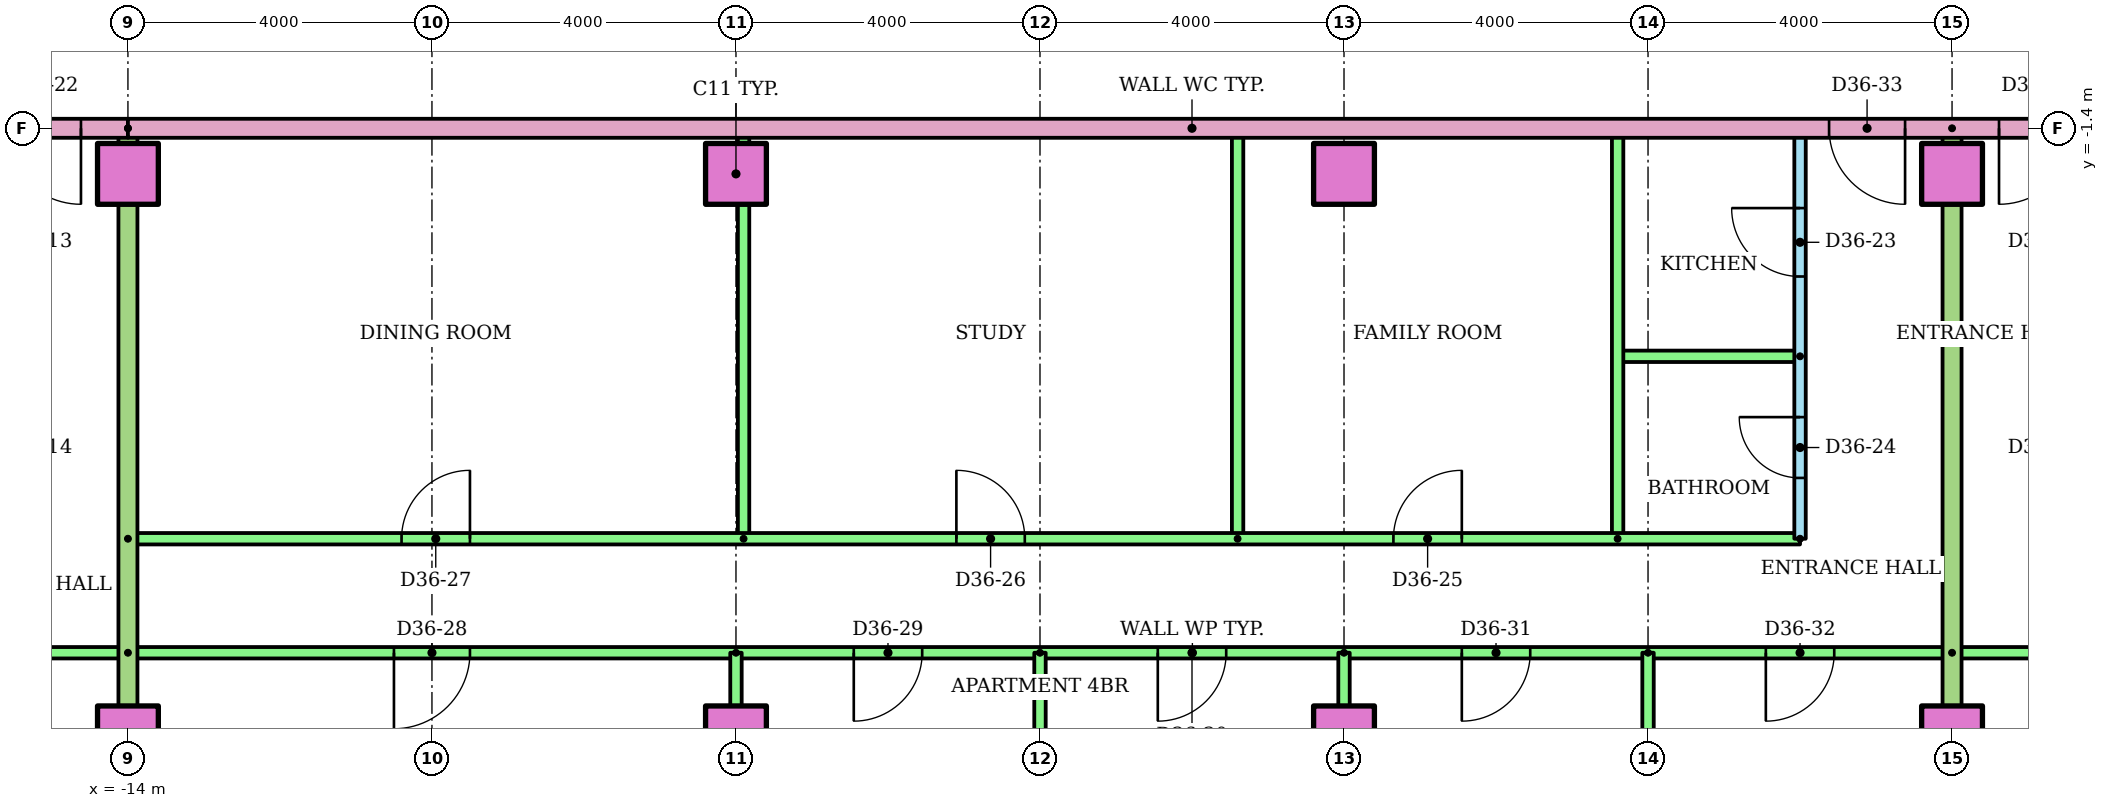
"""IFC4 building model, lengths in metres.
Left out: names, types, materials, properties, quantities, classifications, styles, units other than length and angle.
Written with IfcOpenShell. Run it as: python <this file> out.ifc"""

import sys

from ifc_helpers import new_model, si_unit, direction, frame, frame_2d, origin, origin_2d, place, context, subcontext, project, spatial, rectangle, extrude, element, fill, save


model = new_model("IFC4")
c1 = context("Model", 3, precision=1e-05, world=origin(), true_north=direction((0.0, 1.0)))
c2 = subcontext(c1, "Body", "Model", "MODEL_VIEW")
j1 = project(units=[si_unit("LENGTHUNIT", "METRE"), si_unit("PLANEANGLEUNIT", "RADIAN")], contexts=[c1])
p1 = place(None, origin())
s1 = spatial("IfcSite", under=j1, at=p1, CompositionType="ELEMENT")
p2 = place(p1, origin())
s2 = spatial("IfcBuilding", under=s1, at=p2, CompositionType="ELEMENT")
p3 = place(p2, frame((0.0, 0.0, 139.0)))
s3 = spatial("IfcBuildingStorey", under=s2, at=p3, CompositionType="ELEMENT", Elevation=139.0)
for number, where in (
    (1, (-14.0, -9.4, 0.0)),
    (2, (-6.0, -9.4, 0.0)),
    (3, (2.0, -9.4, 0.0)),
    (4, (10.0, -9.4, 0.0)),
    (5, (-14.0, -2.0, 0.0)),
    (6, (-6.0, -2.0, 0.0)),
    (7, (2.0, -2.0, 0.0)),
    (8, (10.0, -2.0, 0.0)),
):
    element("IfcColumn", number, at=place(p3, frame(where)), inside=s3, PredefinedType="COLUMN", context=c2, shape_type="SweptSolid", body=[
        extrude(rectangle(XDim=0.8, YDim=0.8, at=origin_2d()), origin(), (0.0, 0.0, 1.0), 3.2),
    ])
p4 = place(p3, frame((-14.0, -8.3, 0.0), z_axis=(0.0, 0.0, 1.0), x_axis=(-1.0, 0.0, 0.0)))
e9 = element("IfcWall", 9, at=p4, inside=s3, PredefinedType="PARTITIONING", context=c2, shape_type="SweptSolid", body=[
    extrude(rectangle(XDim=18.71, YDim=0.15, at=frame_2d((9.355, 0.0))), origin(), (0.0, 0.0, 1.0), 2.4),
])
p5 = place(p4, frame((16.618, 0.0, 0.0)))
e10 = element("IfcOpeningElement", 10, at=p5, cuts=e9, PredefinedType="OPENING", context=c2, shape_type="SweptSolid", body=[
    extrude(rectangle(XDim=0.9, YDim=2.1, at=frame_2d((0.45, 1.05))), frame((0.0, 0.085, 0.0), z_axis=(0.0, -1.0, 0.0), x_axis=(1.0, 0.0, 0.0)), (0.0, 0.0, 1.0), 0.17),
])
p6 = place(p4, frame((10.5, 0.0, 0.0)))
e11 = element("IfcOpeningElement", 11, at=p6, cuts=e9, PredefinedType="OPENING", context=c2, shape_type="SweptSolid", body=[
    extrude(rectangle(XDim=1.0, YDim=2.1, at=frame_2d((0.5, 1.05))), frame((0.0, 0.085, 0.0), z_axis=(0.0, -1.0, 0.0), x_axis=(1.0, 0.0, 0.0)), (0.0, 0.0, 1.0), 0.17),
])
p7 = place(p4, frame((5.55, 0.0, 0.0)))
e12 = element("IfcOpeningElement", 12, at=p7, cuts=e9, PredefinedType="OPENING", context=c2, shape_type="SweptSolid", body=[
    extrude(rectangle(XDim=0.9, YDim=2.1, at=frame_2d((0.45, 1.05))), frame((0.0, 0.085, 0.0), z_axis=(0.0, -1.0, 0.0), x_axis=(1.0, 0.0, 0.0)), (0.0, 0.0, 1.0), 0.17),
])
p8 = place(p4, frame((1.55, 0.0, 0.0)))
e13 = element("IfcOpeningElement", 13, at=p8, cuts=e9, PredefinedType="OPENING", context=c2, shape_type="SweptSolid", body=[
    extrude(rectangle(XDim=0.9, YDim=2.1, at=frame_2d((0.45, 1.05))), frame((0.0, 0.085, 0.0), z_axis=(0.0, -1.0, 0.0), x_axis=(1.0, 0.0, 0.0)), (0.0, 0.0, 1.0), 0.17),
])
p9 = place(p3, frame((8.0, -6.8, 0.0), z_axis=(0.0, 0.0, 1.0), x_axis=(0.0, 1.0, 0.0)))
e14 = element("IfcWall", 14, at=p9, inside=s3, PredefinedType="PARTITIONING", context=c2, shape_type="SweptSolid", body=[
    extrude(rectangle(XDim=5.4, YDim=0.15, at=frame_2d((2.7, 0.0))), origin(), (0.0, 0.0, 1.0), 2.4),
])
p10 = place(p9, frame((3.45, 0.0, 0.0)))
e15 = element("IfcOpeningElement", 15, at=p10, cuts=e14, PredefinedType="OPENING", context=c2, shape_type="SweptSolid", body=[
    extrude(rectangle(XDim=0.9, YDim=2.1, at=frame_2d((0.45, 1.05))), frame((0.0, 0.085, 0.0), z_axis=(0.0, -1.0, 0.0), x_axis=(1.0, 0.0, 0.0)), (0.0, 0.0, 1.0), 0.17),
])
p11 = place(p9, frame((0.8, 0.0, 0.0)))
e16 = element("IfcOpeningElement", 16, at=p11, cuts=e14, PredefinedType="OPENING", context=c2, shape_type="SweptSolid", body=[
    extrude(rectangle(XDim=0.8, YDim=2.1, at=frame_2d((0.4, 1.05))), frame((0.0, 0.085, 0.0), z_axis=(0.0, -1.0, 0.0), x_axis=(1.0, 0.0, 0.0)), (0.0, 0.0, 1.0), 0.17),
])
p12 = place(p3, frame((8.0, -4.4, 0.0), z_axis=(0.0, 0.0, 1.0), x_axis=(-1.0, 0.0, 0.0)))
e17 = element("IfcWall", 17, at=p12, inside=s3, PredefinedType="PARTITIONING", context=c2, shape_type="SweptSolid", body=[
    extrude(rectangle(XDim=2.4, YDim=0.15, at=frame_2d((1.2, 0.0))), origin(), (0.0, 0.0, 1.0), 2.4),
])
for number, where, z_axis, x_axis in (
    (18, (5.6, -6.8, 0.0), (0.0, 0.0, 1.0), (0.0, 1.0, 0.0)),
    (19, (0.6, -6.8, 0.0), (0.0, 0.0, 1.0), (0.0, 1.0, 0.0)),
    (20, (-5.9, -6.8, 0.0), (0.0, 0.0, 1.0), (0.0, 1.0, 0.0)),
):
    element("IfcWall", number, at=place(p3, frame(where, z_axis=z_axis, x_axis=x_axis)), inside=s3, PredefinedType="PARTITIONING", context=c2, shape_type="SweptSolid", body=[
        extrude(rectangle(XDim=5.4, YDim=0.15, at=frame_2d((2.7, 0.0))), origin(), (0.0, 0.0, 1.0), 2.4),
    ])
p13 = place(p3, frame((-14.0, -6.8, 0.0)))
e21 = element("IfcWall", 21, at=p13, inside=s3, PredefinedType="PARTITIONING", context=c2, shape_type="SweptSolid", body=[
    extrude(rectangle(XDim=22.0, YDim=0.15, at=frame_2d((11.0, 0.0))), origin(), (0.0, 0.0, 1.0), 2.4),
])
p14 = place(p13, frame((16.65, 0.0, 0.0)))
e22 = element("IfcOpeningElement", 22, at=p14, cuts=e21, PredefinedType="OPENING", context=c2, shape_type="SweptSolid", body=[
    extrude(rectangle(XDim=0.9, YDim=2.1, at=frame_2d((0.45, 1.05))), frame((0.0, 0.085, 0.0), z_axis=(0.0, -1.0, 0.0), x_axis=(1.0, 0.0, 0.0)), (0.0, 0.0, 1.0), 0.17),
])
p15 = place(p13, frame((10.9, 0.0, 0.0)))
e23 = element("IfcOpeningElement", 23, at=p15, cuts=e21, PredefinedType="OPENING", context=c2, shape_type="SweptSolid", body=[
    extrude(rectangle(XDim=0.9, YDim=2.1, at=frame_2d((0.45, 1.05))), frame((0.0, 0.085, 0.0), z_axis=(0.0, -1.0, 0.0), x_axis=(1.0, 0.0, 0.0)), (0.0, 0.0, 1.0), 0.17),
])
p16 = place(p13, frame((3.6, 0.0, 0.0)))
e24 = element("IfcOpeningElement", 24, at=p16, cuts=e21, PredefinedType="OPENING", context=c2, shape_type="SweptSolid", body=[
    extrude(rectangle(XDim=0.9, YDim=2.1, at=frame_2d((0.45, 1.05))), frame((0.0, 0.085, 0.0), z_axis=(0.0, -1.0, 0.0), x_axis=(1.0, 0.0, 0.0)), (0.0, 0.0, 1.0), 0.17),
])
p17 = place(p3, frame((10.0, -8.3, 0.0), z_axis=(0.0, 0.0, 1.0), x_axis=(-1.0, 0.0, 0.0)))
e25 = element("IfcWall", 25, at=p17, inside=s3, PredefinedType="PARTITIONING", context=c2, shape_type="SweptSolid", body=[
    extrude(rectangle(XDim=24.0, YDim=0.15, at=frame_2d((12.0, 0.0))), origin(), (0.0, 0.0, 1.0), 2.4),
])
p18 = place(p17, frame((19.5, 0.0, 0.0)))
e26 = element("IfcOpeningElement", 26, at=p18, cuts=e25, PredefinedType="OPENING", context=c2, shape_type="SweptSolid", body=[
    extrude(rectangle(XDim=1.0, YDim=2.1, at=frame_2d((0.5, 1.05))), frame((0.0, 0.085, 0.0), z_axis=(0.0, -1.0, 0.0), x_axis=(1.0, 0.0, 0.0)), (0.0, 0.0, 1.0), 0.17),
])
p19 = place(p17, frame((13.55, 0.0, 0.0)))
e27 = element("IfcOpeningElement", 27, at=p19, cuts=e25, PredefinedType="OPENING", context=c2, shape_type="SweptSolid", body=[
    extrude(rectangle(XDim=0.9, YDim=2.1, at=frame_2d((0.45, 1.05))), frame((0.0, 0.085, 0.0), z_axis=(0.0, -1.0, 0.0), x_axis=(1.0, 0.0, 0.0)), (0.0, 0.0, 1.0), 0.17),
])
p20 = place(p17, frame((9.55, 0.0, 0.0)))
e28 = element("IfcOpeningElement", 28, at=p20, cuts=e25, PredefinedType="OPENING", context=c2, shape_type="SweptSolid", body=[
    extrude(rectangle(XDim=0.9, YDim=2.1, at=frame_2d((0.45, 1.05))), frame((0.0, 0.085, 0.0), z_axis=(0.0, -1.0, 0.0), x_axis=(1.0, 0.0, 0.0)), (0.0, 0.0, 1.0), 0.17),
])
p21 = place(p17, frame((5.55, 0.0, 0.0)))
e29 = element("IfcOpeningElement", 29, at=p21, cuts=e25, PredefinedType="OPENING", context=c2, shape_type="SweptSolid", body=[
    extrude(rectangle(XDim=0.9, YDim=2.1, at=frame_2d((0.45, 1.05))), frame((0.0, 0.085, 0.0), z_axis=(0.0, -1.0, 0.0), x_axis=(1.0, 0.0, 0.0)), (0.0, 0.0, 1.0), 0.17),
])
p22 = place(p17, frame((1.55, 0.0, 0.0)))
e30 = element("IfcOpeningElement", 30, at=p22, cuts=e25, PredefinedType="OPENING", context=c2, shape_type="SweptSolid", body=[
    extrude(rectangle(XDim=0.9, YDim=2.1, at=frame_2d((0.45, 1.05))), frame((0.0, 0.085, 0.0), z_axis=(0.0, -1.0, 0.0), x_axis=(1.0, 0.0, 0.0)), (0.0, 0.0, 1.0), 0.17),
])
p23 = place(p3, frame((-6.0, -8.3, 0.0), z_axis=(0.0, 0.0, 1.0), x_axis=(0.0, -1.0, 0.0)))
e31 = element("IfcWall", 31, at=p23, inside=s3, PredefinedType="PARTITIONING", context=c2, shape_type="SweptSolid", body=[
    extrude(rectangle(XDim=8.01, YDim=0.15, at=frame_2d((4.005, 0.0))), origin(), (0.0, 0.0, 1.0), 2.4),
])
p24 = place(p3, frame((-2.0, -8.3, 0.0), z_axis=(0.0, 0.0, 1.0), x_axis=(0.0, -1.0, 0.0)))
e32 = element("IfcWall", 32, at=p24, inside=s3, PredefinedType="PARTITIONING", context=c2, shape_type="SweptSolid", body=[
    extrude(rectangle(XDim=8.021, YDim=0.15, at=frame_2d((4.01, 0.0))), origin(), (0.0, 0.0, 1.0), 2.4),
])
p25 = place(p3, frame((2.0, -8.3, 0.0), z_axis=(0.0, 0.0, 1.0), x_axis=(0.0, -1.0, 0.0)))
e33 = element("IfcWall", 33, at=p25, inside=s3, PredefinedType="PARTITIONING", context=c2, shape_type="SweptSolid", body=[
    extrude(rectangle(XDim=8.01, YDim=0.15, at=frame_2d((4.005, 0.0))), origin(), (0.0, 0.0, 1.0), 2.4),
])
p26 = place(p3, frame((6.0, -8.3, 0.0), z_axis=(0.0, 0.0, 1.0), x_axis=(0.0, -1.0, 0.0)))
e34 = element("IfcWall", 34, at=p26, inside=s3, PredefinedType="PARTITIONING", context=c2, shape_type="SweptSolid", body=[
    extrude(rectangle(XDim=8.021, YDim=0.15, at=frame_2d((4.01, 0.0))), origin(), (0.0, 0.0, 1.0), 2.4),
])
p27 = place(p3, frame((-14.0, -1.4, 0.0), z_axis=(0.0, 0.0, 1.0), x_axis=(0.0, -1.0, 0.0)))
e35 = element("IfcWall", 35, at=p27, inside=s3, PredefinedType="PARTITIONING", context=c2, shape_type="SweptSolid", body=[
    extrude(rectangle(XDim=14.91, YDim=0.25, at=frame_2d((7.455, 0.0))), origin(), (0.0, 0.0, 1.0), 2.4),
])
p28 = place(p3, frame((32.72, -8.3, 0.0), z_axis=(0.0, 0.0, 1.0), x_axis=(-1.0, 0.0, 0.0)))
e36 = element("IfcWall", 36, at=p28, inside=s3, PredefinedType="PARTITIONING", context=c2, shape_type="SweptSolid", body=[
    extrude(rectangle(XDim=22.72, YDim=0.15, at=frame_2d((11.36, 0.0))), origin(), (0.0, 0.0, 1.0), 2.4),
])
p29 = place(p28, frame((20.27, 0.0, 0.0)))
e37 = element("IfcOpeningElement", 37, at=p29, cuts=e36, PredefinedType="OPENING", context=c2, shape_type="SweptSolid", body=[
    extrude(rectangle(XDim=0.9, YDim=2.1, at=frame_2d((0.45, 1.05))), frame((0.0, 0.085, 0.0), z_axis=(0.0, -1.0, 0.0), x_axis=(1.0, 0.0, 0.0)), (0.0, 0.0, 1.0), 0.17),
])
p30 = place(p28, frame((16.27, 0.0, 0.0)))
e38 = element("IfcOpeningElement", 38, at=p30, cuts=e36, PredefinedType="OPENING", context=c2, shape_type="SweptSolid", body=[
    extrude(rectangle(XDim=0.9, YDim=2.1, at=frame_2d((0.45, 1.05))), frame((0.0, 0.085, 0.0), z_axis=(0.0, -1.0, 0.0), x_axis=(1.0, 0.0, 0.0)), (0.0, 0.0, 1.0), 0.17),
])
p31 = place(p28, frame((12.27, 0.0, 0.0)))
e39 = element("IfcOpeningElement", 39, at=p31, cuts=e36, PredefinedType="OPENING", context=c2, shape_type="SweptSolid", body=[
    extrude(rectangle(XDim=0.9, YDim=2.1, at=frame_2d((0.45, 1.05))), frame((0.0, 0.085, 0.0), z_axis=(0.0, -1.0, 0.0), x_axis=(1.0, 0.0, 0.0)), (0.0, 0.0, 1.0), 0.17),
])
p32 = place(p28, frame((8.22, 0.0, 0.0)))
e40 = element("IfcOpeningElement", 40, at=p32, cuts=e36, PredefinedType="OPENING", context=c2, shape_type="SweptSolid", body=[
    extrude(rectangle(XDim=1.0, YDim=2.1, at=frame_2d((0.5, 1.05))), frame((0.0, 0.085, 0.0), z_axis=(0.0, -1.0, 0.0), x_axis=(1.0, 0.0, 0.0)), (0.0, 0.0, 1.0), 0.17),
])
p33 = place(p28, frame((3.02, 0.0, 0.0)))
e41 = element("IfcOpeningElement", 41, at=p33, cuts=e36, PredefinedType="OPENING", context=c2, shape_type="SweptSolid", body=[
    extrude(rectangle(XDim=0.9, YDim=2.1, at=frame_2d((0.45, 1.05))), frame((0.0, 0.085, 0.0), z_axis=(0.0, -1.0, 0.0), x_axis=(1.0, 0.0, 0.0)), (0.0, 0.0, 1.0), 0.17),
])
p34 = place(p3, frame((10.0, -1.4, 0.0), z_axis=(0.0, 0.0, 1.0), x_axis=(0.0, -1.0, 0.0)))
e42 = element("IfcWall", 42, at=p34, inside=s3, PredefinedType="PARTITIONING", context=c2, shape_type="SweptSolid", body=[
    extrude(rectangle(XDim=14.91, YDim=0.25, at=frame_2d((7.455, 0.0))), origin(), (0.0, 0.0, 1.0), 2.4),
])
p35 = place(p3, frame((-14.0, -1.4, 0.0), z_axis=(0.0, 0.0, 1.0), x_axis=(-1.0, 0.0, 0.0)))
e43 = element("IfcWall", 43, at=p35, inside=s3, PredefinedType="PARTITIONING", context=c2, shape_type="SweptSolid", body=[
    extrude(rectangle(XDim=15.0, YDim=0.25, at=frame_2d((7.5, 0.0))), origin(), (0.0, 0.0, 1.0), 2.4),
])
p36 = place(p35, frame((0.618, 0.0, 0.0)))
e44 = element("IfcOpeningElement", 44, at=p36, cuts=e43, PredefinedType="OPENING", context=c2, shape_type="SweptSolid", body=[
    extrude(rectangle(XDim=1.0, YDim=2.1, at=frame_2d((0.5, 1.05))), frame((0.0, 0.135, 0.0), z_axis=(0.0, -1.0, 0.0), x_axis=(1.0, 0.0, 0.0)), (0.0, 0.0, 1.0), 0.27),
])
p37 = place(p3, frame((14.0, -1.4, 0.0), z_axis=(0.0, 0.0, 1.0), x_axis=(-1.0, 0.0, 0.0)))
e45 = element("IfcWall", 45, at=p37, inside=s3, PredefinedType="PARTITIONING", context=c2, shape_type="SweptSolid", body=[
    extrude(rectangle(XDim=28.0, YDim=0.25, at=frame_2d((14.0, 0.0))), origin(), (0.0, 0.0, 1.0), 2.4),
])
p38 = place(p37, frame((4.618, 0.0, 0.0)))
e46 = element("IfcOpeningElement", 46, at=p38, cuts=e45, PredefinedType="OPENING", context=c2, shape_type="SweptSolid", body=[
    extrude(rectangle(XDim=1.0, YDim=2.1, at=frame_2d((0.5, 1.05))), frame((0.0, 0.135, 0.0), z_axis=(0.0, -1.0, 0.0), x_axis=(1.0, 0.0, 0.0)), (0.0, 0.0, 1.0), 0.27),
])
p39 = place(p37, frame((2.382, 0.0, 0.0)))
e47 = element("IfcOpeningElement", 47, at=p39, cuts=e45, PredefinedType="OPENING", context=c2, shape_type="SweptSolid", body=[
    extrude(rectangle(XDim=1.0, YDim=2.1, at=frame_2d((0.5, 1.05))), frame((0.0, 0.135, 0.0), z_axis=(0.0, -1.0, 0.0), x_axis=(1.0, 0.0, 0.0)), (0.0, 0.0, 1.0), 0.27),
])
p40 = place(p36, origin())
e48 = element("IfcDoor", 48, at=p40, inside=s3, OperationType="SINGLE_SWING_LEFT", PredefinedType="DOOR", context=c2, shape_type="SweptSolid", body=[
    extrude(rectangle(XDim=1.0, YDim=2.1, at=frame_2d((0.5, 1.05))), frame((0.0, 0.025, 0.0), z_axis=(0.0, -1.0, 0.0), x_axis=(1.0, 0.0, 0.0)), (0.0, 0.0, 1.0), 0.05),
])
fill(e44, e48)
p41 = place(p10, origin())
e49 = element("IfcDoor", 49, at=p41, inside=s3, OperationType="SINGLE_SWING_RIGHT", PredefinedType="DOOR", context=c2, shape_type="SweptSolid", body=[
    extrude(rectangle(XDim=0.9, YDim=2.1, at=frame_2d((0.45, 1.05))), frame((0.0, 0.025, 0.0), z_axis=(0.0, -1.0, 0.0), x_axis=(1.0, 0.0, 0.0)), (0.0, 0.0, 1.0), 0.05),
])
fill(e15, e49)
p42 = place(p11, origin())
e50 = element("IfcDoor", 50, at=p42, inside=s3, OperationType="SINGLE_SWING_RIGHT", PredefinedType="DOOR", context=c2, shape_type="SweptSolid", body=[
    extrude(rectangle(XDim=0.8, YDim=2.1, at=frame_2d((0.4, 1.05))), frame((0.0, 0.025, 0.0), z_axis=(0.0, -1.0, 0.0), x_axis=(1.0, 0.0, 0.0)), (0.0, 0.0, 1.0), 0.05),
])
fill(e16, e50)
p43 = place(p14, origin())
e51 = element("IfcDoor", 51, at=p43, inside=s3, OperationType="SINGLE_SWING_RIGHT", PredefinedType="DOOR", context=c2, shape_type="SweptSolid", body=[
    extrude(rectangle(XDim=0.9, YDim=2.1, at=frame_2d((0.45, 1.05))), frame((0.0, 0.025, 0.0), z_axis=(0.0, -1.0, 0.0), x_axis=(1.0, 0.0, 0.0)), (0.0, 0.0, 1.0), 0.05),
])
fill(e22, e51)
p44 = place(p15, origin())
e52 = element("IfcDoor", 52, at=p44, inside=s3, OperationType="SINGLE_SWING_LEFT", PredefinedType="DOOR", context=c2, shape_type="SweptSolid", body=[
    extrude(rectangle(XDim=0.9, YDim=2.1, at=frame_2d((0.45, 1.05))), frame((0.0, 0.025, 0.0), z_axis=(0.0, -1.0, 0.0), x_axis=(1.0, 0.0, 0.0)), (0.0, 0.0, 1.0), 0.05),
])
fill(e23, e52)
p45 = place(p16, origin())
e53 = element("IfcDoor", 53, at=p45, inside=s3, OperationType="SINGLE_SWING_RIGHT", PredefinedType="DOOR", context=c2, shape_type="SweptSolid", body=[
    extrude(rectangle(XDim=0.9, YDim=2.1, at=frame_2d((0.45, 1.05))), frame((0.0, 0.025, 0.0), z_axis=(0.0, -1.0, 0.0), x_axis=(1.0, 0.0, 0.0)), (0.0, 0.0, 1.0), 0.05),
])
fill(e24, e53)
p46 = place(p18, origin())
e54 = element("IfcDoor", 54, at=p46, inside=s3, OperationType="SINGLE_SWING_RIGHT", PredefinedType="DOOR", context=c2, shape_type="SweptSolid", body=[
    extrude(rectangle(XDim=1.0, YDim=2.1, at=frame_2d((0.5, 1.05))), frame((0.0, 0.025, 0.0), z_axis=(0.0, -1.0, 0.0), x_axis=(1.0, 0.0, 0.0)), (0.0, 0.0, 1.0), 0.05),
])
fill(e26, e54)
p47 = place(p19, origin())
e55 = element("IfcDoor", 55, at=p47, inside=s3, OperationType="SINGLE_SWING_RIGHT", PredefinedType="DOOR", context=c2, shape_type="SweptSolid", body=[
    extrude(rectangle(XDim=0.9, YDim=2.1, at=frame_2d((0.45, 1.05))), frame((0.0, 0.025, 0.0), z_axis=(0.0, -1.0, 0.0), x_axis=(1.0, 0.0, 0.0)), (0.0, 0.0, 1.0), 0.05),
])
fill(e27, e55)
p48 = place(p20, origin())
e56 = element("IfcDoor", 56, at=p48, inside=s3, OperationType="SINGLE_SWING_RIGHT", PredefinedType="DOOR", context=c2, shape_type="SweptSolid", body=[
    extrude(rectangle(XDim=0.9, YDim=2.1, at=frame_2d((0.45, 1.05))), frame((0.0, 0.025, 0.0), z_axis=(0.0, -1.0, 0.0), x_axis=(1.0, 0.0, 0.0)), (0.0, 0.0, 1.0), 0.05),
])
fill(e28, e56)
p49 = place(p21, origin())
e57 = element("IfcDoor", 57, at=p49, inside=s3, OperationType="SINGLE_SWING_RIGHT", PredefinedType="DOOR", context=c2, shape_type="SweptSolid", body=[
    extrude(rectangle(XDim=0.9, YDim=2.1, at=frame_2d((0.45, 1.05))), frame((0.0, 0.025, 0.0), z_axis=(0.0, -1.0, 0.0), x_axis=(1.0, 0.0, 0.0)), (0.0, 0.0, 1.0), 0.05),
])
fill(e29, e57)
p50 = place(p22, origin())
e58 = element("IfcDoor", 58, at=p50, inside=s3, OperationType="SINGLE_SWING_RIGHT", PredefinedType="DOOR", context=c2, shape_type="SweptSolid", body=[
    extrude(rectangle(XDim=0.9, YDim=2.1, at=frame_2d((0.45, 1.05))), frame((0.0, 0.025, 0.0), z_axis=(0.0, -1.0, 0.0), x_axis=(1.0, 0.0, 0.0)), (0.0, 0.0, 1.0), 0.05),
])
fill(e30, e58)
p51 = place(p38, origin())
e59 = element("IfcDoor", 59, at=p51, inside=s3, OperationType="SINGLE_SWING_LEFT", PredefinedType="DOOR", context=c2, shape_type="SweptSolid", body=[
    extrude(rectangle(XDim=1.0, YDim=2.1, at=frame_2d((0.5, 1.05))), frame((0.0, 0.025, 0.0), z_axis=(0.0, -1.0, 0.0), x_axis=(1.0, 0.0, 0.0)), (0.0, 0.0, 1.0), 0.05),
])
fill(e46, e59)
p52 = place(p39, origin())
e60 = element("IfcDoor", 60, at=p52, inside=s3, OperationType="SINGLE_SWING_RIGHT", PredefinedType="DOOR", context=c2, shape_type="SweptSolid", body=[
    extrude(rectangle(XDim=1.0, YDim=2.1, at=frame_2d((0.5, 1.05))), frame((0.0, 0.025, 0.0), z_axis=(0.0, -1.0, 0.0), x_axis=(1.0, 0.0, 0.0)), (0.0, 0.0, 1.0), 0.05),
])
fill(e47, e60)
save(model, sys.argv[1])
